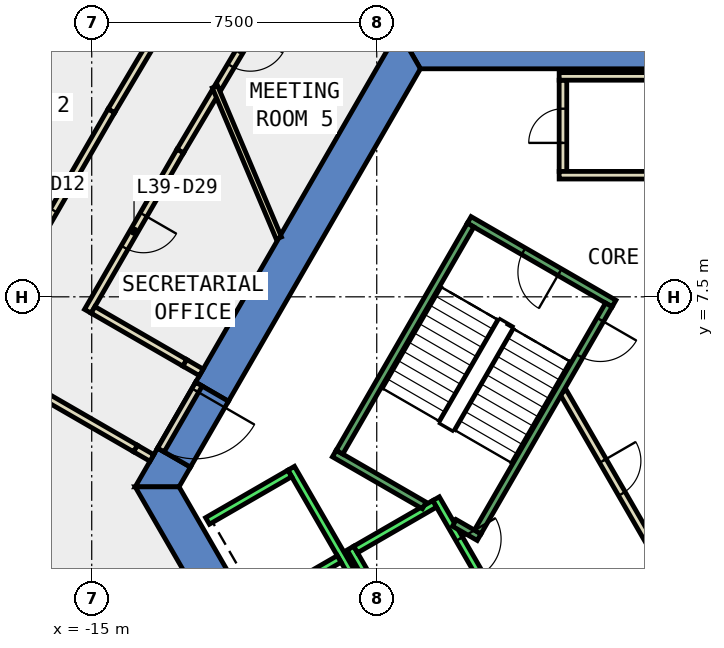
"""IFC4 building model, lengths in metres.
Left out: names, types, materials, properties, quantities, classifications, styles, units other than length and angle.
Written with IfcOpenShell. Run it as: python <this file> out.ifc"""

import sys

from ifc_helpers import new_model, si_unit, direction, frame, frame_2d, origin, place, context, subcontext, project, spatial, polyline, rectangle, outline, extrude, element, fill, save


model = new_model("IFC4")
c1 = context("Model", 3, precision=1e-05, world=origin(), true_north=direction((0.0, 1.0)))
c2 = subcontext(c1, "Body", "Model", "MODEL_VIEW")
j1 = project(units=[si_unit("LENGTHUNIT", "METRE"), si_unit("PLANEANGLEUNIT", "RADIAN")], contexts=[c1])
p1 = place(None, origin())
s1 = spatial("IfcSite", under=j1, at=p1, CompositionType="ELEMENT")
p2 = place(p1, origin())
s2 = spatial("IfcBuilding", under=s1, at=p2, CompositionType="ELEMENT")
p3 = place(p2, frame((0.0, 0.0, 176.0)))
s3 = spatial("IfcBuildingStorey", under=s2, at=p3, CompositionType="ELEMENT", Elevation=176.0)
p4 = place(p3, frame((0.0, 0.0, -0.4)))
e1 = element("IfcWall", 1, at=p4, inside=s3, PredefinedType="SHEAR", context=c2, shape_type="SweptSolid", body=[
    extrude(outline(polyline([(6.928, 14.5), (-6.928, 14.5), (-6.351, 13.5), (6.351, 13.5), (6.928, 14.5)])), origin(), (0.0, 0.0, 1.0), 4.2),
])
p5 = place(p3, frame((0.0, 0.0, -0.4)))
e2 = element("IfcWall", 2, at=p5, inside=s3, PredefinedType="SHEAR", context=c2, shape_type="SweptSolid", body=[
    extrude(outline(polyline([(-12.267, 5.252), (-11.402, 4.752), (-6.351, 13.5), (-6.928, 14.5), (-12.267, 5.252)])), origin(), (0.0, 0.0, 1.0), 4.2),
])
p6 = place(p3, frame((0.0, 0.0, -0.4)))
e3 = element("IfcWall", 3, at=p6, inside=s3, PredefinedType="SHEAR", context=c2, shape_type="SweptSolid", body=[
    extrude(outline(polyline([(-12.402, 3.02), (-13.267, 3.52), (-13.856, 2.5), (-12.702, 2.5), (-12.402, 3.02)])), origin(), (0.0, 0.0, 1.0), 4.2),
])
p7 = place(p3, frame((0.0, 0.0, 3.6)))
e4 = element("IfcWall", 4, at=p7, inside=s3, PredefinedType="SHEAR", context=c2, shape_type="SweptSolid", body=[
    extrude(outline(polyline([(-13.267, 3.52), (-12.402, 3.02), (-11.402, 4.752), (-12.267, 5.252), (-13.267, 3.52)])), origin(), (0.0, 0.0, 1.0), 0.2),
])
p8 = place(p3, frame((0.0, 0.0, -0.4)))
e5 = element("IfcWall", 5, at=p8, inside=s3, PredefinedType="SHEAR", context=c2, shape_type="SweptSolid", body=[
    extrude(outline(polyline([(-13.856, 2.5), (-6.928, -9.5), (-6.351, -8.5), (-12.702, 2.5), (-13.856, 2.5)])), origin(), (0.0, 0.0, 1.0), 4.2),
])
p9 = place(p3, frame((-10.484, 15.014, 0.0), z_axis=(0.0, 0.0, 1.0), x_axis=(-0.510627855782, -0.859801833506, 0.0)))
e6 = element("IfcWall", 6, at=p9, inside=s3, PredefinedType="PARTITIONING", context=c2, shape_type="SweptSolid", body=[
    extrude(rectangle(XDim=2.342, YDim=0.2, at=frame_2d((1.171, 0.0))), origin(), (0.0, 0.0, 1.0), 3.75),
])
p10 = place(p9, frame((0.671, 0.0, 0.0)))
e7 = element("IfcOpeningElement", 7, at=p10, cuts=e6, PredefinedType="OPENING", context=c2, shape_type="SweptSolid", body=[
    extrude(rectangle(XDim=1.0, YDim=2.1, at=frame_2d((0.5, 1.05))), frame((0.0, 0.11, 0.0), z_axis=(0.0, -1.0, 0.0), x_axis=(1.0, 0.0, 0.0)), (0.0, 0.0, 1.0), 0.22),
])
p11 = place(p3, frame((-11.757, 12.871, 0.0), z_axis=(0.0, 0.0, 1.0), x_axis=(-0.510614478889, -0.85980977777, 0.0)))
e8 = element("IfcWall", 8, at=p11, inside=s3, PredefinedType="PARTITIONING", context=c2, shape_type="SweptSolid", body=[
    extrude(rectangle(XDim=1.788, YDim=0.2, at=frame_2d((0.894, 0.0))), origin(), (0.0, 0.0, 1.0), 3.75),
])
p12 = place(p3, frame((-12.67, 11.334, 0.0), z_axis=(0.0, 0.0, 1.0), x_axis=(-0.500035159864, -0.866005103276, 0.0)))
e9 = element("IfcWall", 9, at=p12, inside=s3, PredefinedType="PARTITIONING", context=c2, shape_type="SweptSolid", body=[
    extrude(rectangle(XDim=4.866, YDim=0.2, at=frame_2d((2.433, 0.0))), origin(), (0.0, 0.0, 1.0), 3.75),
])
p13 = place(p12, frame((1.933, 0.0, 0.0)))
e10 = element("IfcOpeningElement", 10, at=p13, cuts=e9, PredefinedType="OPENING", context=c2, shape_type="SweptSolid", body=[
    extrude(rectangle(XDim=1.0, YDim=2.1, at=frame_2d((0.5, 1.05))), frame((0.0, 0.11, 0.0), z_axis=(0.0, -1.0, 0.0), x_axis=(1.0, 0.0, 0.0)), (0.0, 0.0, 1.0), 0.22),
])
p14 = place(p3, frame((-14.966, 7.157, 0.0), z_axis=(0.0, 0.0, 1.0), x_axis=(0.86600487494, -0.500035555316, 0.0)))
e11 = element("IfcWall", 11, at=p14, inside=s3, PredefinedType="PARTITIONING", context=c2, shape_type="SweptSolid", body=[
    extrude(rectangle(XDim=2.79, YDim=0.2, at=frame_2d((1.395, 0.0))), origin(), (0.0, 0.0, 1.0), 3.75),
])
p15 = place(p3, frame((-13.417, 3.26, 0.0), z_axis=(0.0, 0.0, 1.0), x_axis=(-0.866071776036, 0.499919672301, 0.0)))
e12 = element("IfcWall", 12, at=p15, inside=s3, PredefinedType="PARTITIONING", context=c2, shape_type="SweptSolid", body=[
    extrude(rectangle(XDim=0.5, YDim=0.2, at=frame_2d((0.25, 0.0))), origin(), (0.0, 0.0, 1.0), 2.4),
])
p16 = place(p3, frame((-18.012, 6.28, 0.0), z_axis=(0.0, 0.0, 1.0), x_axis=(0.49995092924, 0.866053732947, 0.0)))
e13 = element("IfcWall", 13, at=p16, inside=s3, PredefinedType="PARTITIONING", context=c2, shape_type="SweptSolid", body=[
    extrude(rectangle(XDim=7.061, YDim=0.2, at=frame_2d((3.53, 0.0))), origin(), (0.0, 0.0, 1.0), 3.75),
])
p17 = place(p16, frame((3.03, 0.0, 0.0)))
e14 = element("IfcOpeningElement", 14, at=p17, cuts=e13, PredefinedType="OPENING", context=c2, shape_type="SweptSolid", body=[
    extrude(rectangle(XDim=1.0, YDim=2.1, at=frame_2d((0.5, 1.05))), frame((0.0, 0.11, 0.0), z_axis=(0.0, -1.0, 0.0), x_axis=(1.0, 0.0, 0.0)), (0.0, 0.0, 1.0), 0.22),
])
p18 = place(p3, frame((-14.482, 12.395, 0.0), z_axis=(0.0, 0.0, 1.0), x_axis=(0.51050904729, 0.859872381598, 0.0)))
e15 = element("IfcWall", 15, at=p18, inside=s3, PredefinedType="PARTITIONING", context=c2, shape_type="SweptSolid", body=[
    extrude(rectangle(XDim=3.418, YDim=0.2, at=frame_2d((1.709, 0.0))), origin(), (0.0, 0.0, 1.0), 3.75),
])
p19 = place(p3, frame((-2.6, 10.8, 0.0), z_axis=(0.0, 0.0, 1.0), x_axis=(0.0, 1.0, 0.0)))
e16 = element("IfcWall", 16, at=p19, inside=s3, PredefinedType="PARTITIONING", context=c2, shape_type="SweptSolid", body=[
    extrude(rectangle(XDim=2.4, YDim=0.2, at=frame_2d((1.2, 0.0))), origin(), (0.0, 0.0, 1.0), 3.75),
])
p20 = place(p19, frame((0.75, 0.0, 0.0)))
e17 = element("IfcOpeningElement", 17, at=p20, cuts=e16, PredefinedType="OPENING", context=c2, shape_type="SweptSolid", body=[
    extrude(rectangle(XDim=0.9, YDim=2.1, at=frame_2d((0.45, 1.05))), frame((0.0, 0.11, 0.0), z_axis=(0.0, -1.0, 0.0), x_axis=(1.0, 0.0, 0.0)), (0.0, 0.0, 1.0), 0.22),
])
for number, where, z_axis, x_axis in (
    (18, (-2.7, 13.3, 0.0), (0.0, 0.0, 1.0), (1.0, 0.0, 0.0)),
    (19, (2.7, 10.7, 0.0), (0.0, 0.0, 1.0), (-1.0, 0.0, 0.0)),
):
    element("IfcWall", number, at=place(p3, frame(where, z_axis=z_axis, x_axis=x_axis)), inside=s3, PredefinedType="PARTITIONING", context=c2, shape_type="SweptSolid", body=[
        extrude(rectangle(XDim=5.4, YDim=0.2, at=frame_2d((2.7, 0.0))), origin(), (0.0, 0.0, 1.0), 3.75),
    ])
p21 = place(p3, frame((-10.076, 9.047, 0.0), z_axis=(0.0, 0.0, 1.0), x_axis=(-0.389223462263, 0.921143363665, 0.0)))
e20 = element("IfcWall", 20, at=p21, inside=s3, PredefinedType="PARTITIONING", context=c2, shape_type="SweptSolid", body=[
    extrude(rectangle(XDim=4.322, YDim=0.15, at=frame_2d((2.161, 0.0))), origin(), (0.0, 0.0, 1.0), 3.75),
])
p22 = place(p3, frame((-0.866, -1.0, 0.0), z_axis=(0.0, 0.0, 1.0), x_axis=(0.500033287521, 0.866006184372, 0.0)))
e21 = element("IfcWall", 21, at=p22, inside=s3, PredefinedType="PARTITIONING", context=c2, shape_type="SweptSolid", body=[
    extrude(rectangle(XDim=1.632, YDim=0.2, at=frame_2d((0.816, 0.0))), origin(), (0.0, 0.0, 1.0), 3.75),
])
p23 = place(p3, frame((-2.598, 5.0, 0.0), z_axis=(0.0, 0.0, 1.0), x_axis=(0.49995654735, -0.86605048973, 0.0)))
e22 = element("IfcWall", 22, at=p23, inside=s3, PredefinedType="PARTITIONING", context=c2, shape_type="SweptSolid", body=[
    extrude(rectangle(XDim=5.296, YDim=0.2, at=frame_2d((2.648, 0.0))), origin(), (0.0, 0.0, 1.0), 3.75),
])
p24 = place(p23, frame((2.098, 0.0, 0.0)))
e23 = element("IfcOpeningElement", 23, at=p24, cuts=e22, PredefinedType="OPENING", context=c2, shape_type="SweptSolid", body=[
    extrude(rectangle(XDim=1.0, YDim=2.1, at=frame_2d((0.5, 1.05))), frame((0.0, 0.11, 0.0), z_axis=(0.0, -1.0, 0.0), x_axis=(1.0, 0.0, 0.0)), (0.0, 0.0, 1.0), 0.22),
])
p25 = place(p3, frame((-12.18, 5.202, 0.0), z_axis=(0.0, 0.0, 1.0), x_axis=(-0.50002537861, -0.866010750942, 0.0)))
e24 = element("IfcWall", 24, at=p25, inside=s3, PredefinedType="PARTITIONING", context=c2, shape_type="SweptSolid", body=[
    extrude(rectangle(XDim=2.0, YDim=0.2, at=frame_2d((1.0, 0.0))), origin(), (0.0, 0.0, 1.0), 2.4),
])
p26 = place(p25, frame((0.19, 0.0, 0.0)))
e25 = element("IfcOpeningElement", 25, at=p26, cuts=e24, PredefinedType="OPENING", context=c2, shape_type="SweptSolid", body=[
    extrude(rectangle(XDim=1.8, YDim=2.1, at=frame_2d((0.9, 1.05))), frame((0.0, 0.11, 0.0), z_axis=(0.0, -1.0, 0.0), x_axis=(1.0, 0.0, 0.0)), (0.0, 0.0, 1.0), 0.22),
])
p27 = place(p3, frame((-12.55, 5.762, 0.0), z_axis=(0.0, 0.0, 1.0), x_axis=(0.866071776036, -0.499919672301, 0.0)))
e26 = element("IfcWall", 26, at=p27, inside=s3, PredefinedType="PARTITIONING", context=c2, shape_type="SweptSolid", body=[
    extrude(rectangle(XDim=0.5, YDim=0.2, at=frame_2d((0.25, 0.0))), origin(), (0.0, 0.0, 1.0), 2.4),
])
p28 = place(p3, frame((-13.85, 3.51, 0.0), z_axis=(0.0, 0.0, 1.0), x_axis=(-0.866087780421, 0.49989194493, 0.0)))
e27 = element("IfcWall", 27, at=p28, inside=s3, PredefinedType="PARTITIONING", context=c2, shape_type="SweptSolid", body=[
    extrude(rectangle(XDim=2.785, YDim=0.2, at=frame_2d((1.392, 0.0))), origin(), (0.0, 0.0, 1.0), 3.75),
])
p29 = place(p3, frame((-5.94, 2.188, 0.0), z_axis=(0.0, 0.0, 1.0), x_axis=(0.49994636267, -0.866056369097, 0.0)))
e28 = element("IfcWall", 28, at=p29, inside=s3, PredefinedType="STANDARD", context=c2, shape_type="SweptSolid", body=[
    extrude(rectangle(XDim=2.8, YDim=0.2, at=frame_2d((1.4, 0.0))), origin(), (0.0, 0.0, 1.0), 3.75),
])
p30 = place(p29, frame((1.225, 0.0, 0.0)))
e29 = element("IfcOpeningElement", 29, at=p30, cuts=e28, PredefinedType="OPENING", context=c2, shape_type="SweptSolid", body=[
    extrude(rectangle(XDim=1.1, YDim=2.1, at=frame_2d((0.55, 1.05))), frame((0.0, 0.11, 0.0), z_axis=(0.0, -1.0, 0.0), x_axis=(1.0, 0.0, 0.0)), (0.0, 0.0, 1.0), 0.22),
])
p31 = place(p3, frame((-8.192, 0.888, 0.0), z_axis=(0.0, 0.0, 1.0), x_axis=(0.49994636267, -0.866056369097, 0.0)))
e30 = element("IfcWall", 30, at=p31, inside=s3, PredefinedType="STANDARD", context=c2, shape_type="SweptSolid", body=[
    extrude(rectangle(XDim=2.8, YDim=0.2, at=frame_2d((1.4, 0.0))), origin(), (0.0, 0.0, 1.0), 3.75),
])
p32 = place(p3, frame((-5.977, 2.052, 0.0), z_axis=(0.0, 0.0, 1.0), x_axis=(-0.865973769406, -0.500089422704, 0.0)))
e31 = element("IfcWall", 31, at=p32, inside=s3, PredefinedType="STANDARD", context=c2, shape_type="SweptSolid", body=[
    extrude(rectangle(XDim=2.399, YDim=0.2, at=frame_2d((1.2, 0.0))), origin(), (0.0, 0.0, 1.0), 3.75),
])
p33 = place(p3, frame((-9.751, 2.99, 0.0), z_axis=(0.0, 0.0, 1.0), x_axis=(0.50000090737, -0.866024879913, 0.0)))
e32 = element("IfcWall", 32, at=p33, inside=s3, PredefinedType="STANDARD", context=c2, shape_type="SweptSolid", body=[
    extrude(rectangle(XDim=10.6, YDim=0.2, at=frame_2d((5.3, 0.0))), origin(), (0.0, 0.0, 1.0), 3.75),
])
p34 = place(p3, frame((-9.788, 2.853, 0.0), z_axis=(0.0, 0.0, 1.0), x_axis=(-0.865998541277, -0.500046524342, 0.0)))
e33 = element("IfcWall", 33, at=p34, inside=s3, PredefinedType="STANDARD", context=c2, shape_type="SweptSolid", body=[
    extrude(rectangle(XDim=2.5, YDim=0.2, at=frame_2d((1.25, 0.0))), origin(), (0.0, 0.0, 1.0), 3.75),
])
p35 = place(p3, frame((-8.488, 0.602, 0.0), z_axis=(0.0, 0.0, 1.0), x_axis=(-0.866022959057, -0.500004234368, 0.0)))
e34 = element("IfcWall", 34, at=p35, inside=s3, PredefinedType="STANDARD", context=c2, shape_type="SweptSolid", body=[
    extrude(rectangle(XDim=2.5, YDim=0.2, at=frame_2d((1.25, 0.0))), origin(), (0.0, 0.0, 1.0), 3.75),
])
p36 = place(p3, frame((-1.256, 7.324, 0.0), z_axis=(0.0, 0.0, 1.0), x_axis=(-0.866046073146, 0.499964197906, 0.0)))
e35 = element("IfcWall", 35, at=p36, inside=s3, PredefinedType="STANDARD", context=c2, shape_type="SweptSolid", body=[
    extrude(rectangle(XDim=4.4, YDim=0.2, at=frame_2d((2.2, 0.0))), origin(), (0.0, 0.0, 1.0), 3.75),
])
p37 = place(p36, frame((1.65, 0.0, 0.0)))
e36 = element("IfcOpeningElement", 36, at=p37, cuts=e35, PredefinedType="OPENING", context=c2, shape_type="SweptSolid", body=[
    extrude(rectangle(XDim=1.1, YDim=2.2, at=frame_2d((0.55, 1.1))), frame((0.0, 0.11, 0.0), z_axis=(0.0, -1.0, 0.0), x_axis=(1.0, 0.0, 0.0)), (0.0, 0.0, 1.0), 0.22),
])
p38 = place(p3, frame((-6.25, 2.01, 0.0), z_axis=(0.0, 0.0, 1.0), x_axis=(-0.86611865017, 0.499838457731, 0.0)))
e37 = element("IfcWall", 37, at=p38, inside=s3, PredefinedType="STANDARD", context=c2, shape_type="SweptSolid", body=[
    extrude(rectangle(XDim=2.733, YDim=0.2, at=frame_2d((1.366, 0.0))), origin(), (0.0, 0.0, 1.0), 3.75),
])
p39 = place(p3, frame((-4.806, 1.176, 0.0), z_axis=(0.0, 0.0, 1.0), x_axis=(-0.866558586415, 0.499075361355, 0.0)))
e38 = element("IfcWall", 38, at=p39, inside=s3, PredefinedType="STANDARD", context=c2, shape_type="SweptSolid", body=[
    extrude(rectangle(XDim=0.751, YDim=0.2, at=frame_2d((0.376, 0.0))), origin(), (0.0, 0.0, 1.0), 3.75),
])
p40 = place(p3, frame((-1.393, 7.288, 0.0), z_axis=(0.0, 0.0, 1.0), x_axis=(-0.499963383562, -0.866046543262, 0.0)))
e39 = element("IfcWall", 39, at=p40, inside=s3, PredefinedType="STANDARD", context=c2, shape_type="SweptSolid", body=[
    extrude(rectangle(XDim=6.9, YDim=0.2, at=frame_2d((3.45, 0.0))), origin(), (0.0, 0.0, 1.0), 3.75),
])
p41 = place(p40, frame((0.45, 0.0, 0.0)))
e40 = element("IfcOpeningElement", 40, at=p41, cuts=e39, PredefinedType="OPENING", context=c2, shape_type="SweptSolid", body=[
    extrude(rectangle(XDim=1.1, YDim=2.2, at=frame_2d((0.55, 1.1))), frame((0.0, 0.11, 0.0), z_axis=(0.0, -1.0, 0.0), x_axis=(1.0, 0.0, 0.0)), (0.0, 0.0, 1.0), 0.22),
])
p42 = place(p3, frame((-5.03, 9.388, 0.0), z_axis=(0.0, 0.0, 1.0), x_axis=(-0.499978703459, -0.866037698999, 0.0)))
e41 = element("IfcWall", 41, at=p42, inside=s3, PredefinedType="STANDARD", context=c2, shape_type="SweptSolid", body=[
    extrude(rectangle(XDim=6.9, YDim=0.2, at=frame_2d((3.45, 0.0))), origin(), (0.0, 0.0, 1.0), 3.75),
])
p43 = place(p17, origin())
e42 = element("IfcDoor", 42, at=p43, inside=s3, OperationType="SINGLE_SWING_LEFT", PredefinedType="DOOR", context=c2, shape_type="SweptSolid", body=[
    extrude(rectangle(XDim=1.0, YDim=2.1, at=frame_2d((0.5, 1.05))), frame((0.0, 0.025, 0.0), z_axis=(0.0, -1.0, 0.0), x_axis=(1.0, 0.0, 0.0)), (0.0, 0.0, 1.0), 0.05),
])
fill(e14, e42)
p44 = place(p10, origin())
e43 = element("IfcDoor", 43, at=p44, inside=s3, OperationType="SINGLE_SWING_LEFT", PredefinedType="DOOR", context=c2, shape_type="SweptSolid", body=[
    extrude(rectangle(XDim=1.0, YDim=2.1, at=frame_2d((0.5, 1.05))), frame((0.0, 0.025, 0.0), z_axis=(0.0, -1.0, 0.0), x_axis=(1.0, 0.0, 0.0)), (0.0, 0.0, 1.0), 0.05),
])
fill(e7, e43)
p45 = place(p13, origin())
e44 = element("IfcDoor", 44, at=p45, inside=s3, OperationType="SINGLE_SWING_LEFT", PredefinedType="DOOR", context=c2, shape_type="SweptSolid", body=[
    extrude(rectangle(XDim=1.0, YDim=2.1, at=frame_2d((0.5, 1.05))), frame((0.0, 0.025, 0.0), z_axis=(0.0, -1.0, 0.0), x_axis=(1.0, 0.0, 0.0)), (0.0, 0.0, 1.0), 0.05),
])
fill(e10, e44)
p46 = place(p24, origin())
e45 = element("IfcDoor", 45, at=p46, inside=s3, OperationType="SINGLE_SWING_RIGHT", PredefinedType="DOOR", context=c2, shape_type="SweptSolid", body=[
    extrude(rectangle(XDim=1.0, YDim=2.1, at=frame_2d((0.5, 1.05))), frame((0.0, 0.025, 0.0), z_axis=(0.0, -1.0, 0.0), x_axis=(1.0, 0.0, 0.0)), (0.0, 0.0, 1.0), 0.05),
])
fill(e23, e45)
p47 = place(p20, origin())
e46 = element("IfcDoor", 46, at=p47, inside=s3, OperationType="SINGLE_SWING_LEFT", PredefinedType="DOOR", context=c2, shape_type="SweptSolid", body=[
    extrude(rectangle(XDim=0.9, YDim=2.1, at=frame_2d((0.45, 1.05))), frame((0.0, 0.025, 0.0), z_axis=(0.0, -1.0, 0.0), x_axis=(1.0, 0.0, 0.0)), (0.0, 0.0, 1.0), 0.05),
])
fill(e17, e46)
p48 = place(p26, origin())
e47 = element("IfcDoor", 47, at=p48, inside=s3, OperationType="DOUBLE_DOOR_SINGLE_SWING", PredefinedType="DOOR", context=c2, shape_type="SweptSolid", body=[
    extrude(rectangle(XDim=1.8, YDim=2.1, at=frame_2d((0.9, 1.05))), frame((0.0, 0.025, 0.0), z_axis=(0.0, -1.0, 0.0), x_axis=(1.0, 0.0, 0.0)), (0.0, 0.0, 1.0), 0.05),
])
fill(e25, e47)
p49 = place(p30, origin())
e48 = element("IfcDoor", 48, at=p49, inside=s3, OperationType="SLIDING_TO_LEFT", PredefinedType="DOOR", context=c2, shape_type="SweptSolid", body=[
    extrude(rectangle(XDim=1.1, YDim=2.1, at=frame_2d((0.55, 1.05))), frame((0.0, 0.025, 0.0), z_axis=(0.0, -1.0, 0.0), x_axis=(1.0, 0.0, 0.0)), (0.0, 0.0, 1.0), 0.05),
])
fill(e29, e48)
p50 = place(p41, origin())
e49 = element("IfcDoor", 49, at=p50, inside=s3, OperationType="SINGLE_SWING_LEFT", PredefinedType="DOOR", context=c2, shape_type="SweptSolid", body=[
    extrude(rectangle(XDim=1.1, YDim=2.2, at=frame_2d((0.55, 1.1))), frame((0.0, 0.025, 0.0), z_axis=(0.0, -1.0, 0.0), x_axis=(1.0, 0.0, 0.0)), (0.0, 0.0, 1.0), 0.05),
])
fill(e40, e49)
p51 = place(p37, origin())
e50 = element("IfcDoor", 50, at=p51, inside=s3, OperationType="SINGLE_SWING_LEFT", PredefinedType="DOOR", context=c2, shape_type="SweptSolid", body=[
    extrude(rectangle(XDim=1.1, YDim=2.2, at=frame_2d((0.55, 1.1))), frame((0.0, 0.025, 0.0), z_axis=(0.0, -1.0, 0.0), x_axis=(1.0, 0.0, 0.0)), (0.0, 0.0, 1.0), 0.05),
])
fill(e36, e50)
save(model, sys.argv[1])
